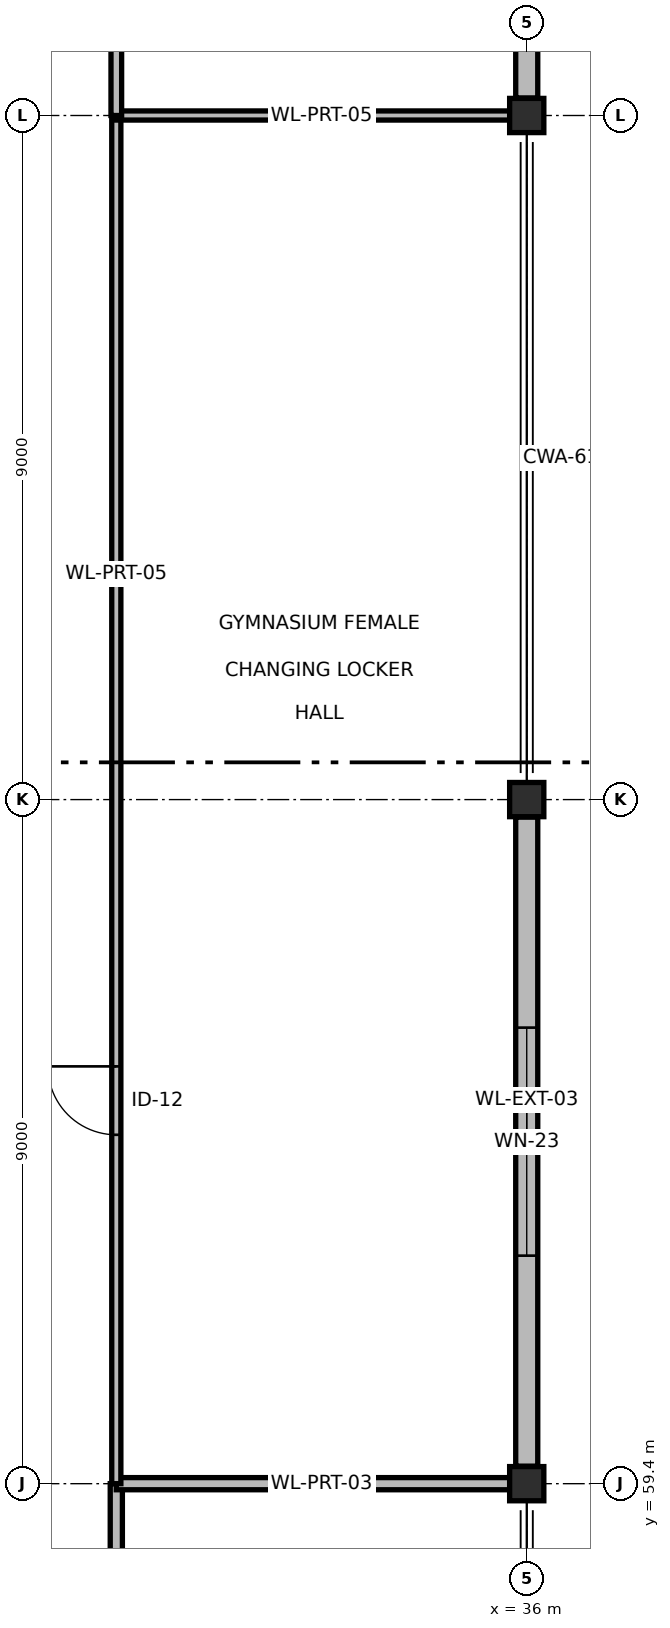
"""IFC4 building model, lengths in metres.
Left out: names, types, materials, properties, quantities, classifications, styles, units other than length and angle.
Written with IfcOpenShell. Run it as: python <this file> out.ifc"""

import sys

from ifc_helpers import new_model, si_unit, direction, frame, frame_2d, origin, origin_2d, place, context, subcontext, project, spatial, rectangle, extrude, element, fill, save


model = new_model("IFC4")
c1 = context("Model", 3, precision=1e-05, world=origin(), true_north=direction((0.0, 1.0)))
c2 = subcontext(c1, "Body", "Model", "MODEL_VIEW")
j1 = project(units=[si_unit("LENGTHUNIT", "METRE"), si_unit("PLANEANGLEUNIT", "RADIAN")], contexts=[c1])
p1 = place(None, origin())
s1 = spatial("IfcSite", under=j1, at=p1, CompositionType="ELEMENT")
p2 = place(p1, origin())
s2 = spatial("IfcBuilding", under=s1, at=p2, CompositionType="ELEMENT")
p3 = place(p2, frame((0.0, 0.0, 9.6)))
s3 = spatial("IfcBuildingStorey", under=s2, at=p3, CompositionType="ELEMENT", Elevation=9.6)
for number, where, z_axis, x_axis in (
    (1, (36.0, 59.4, 0.0), (0.0, 0.0, 1.0), (1.0, 0.0, 0.0)),
    (2, (36.0, 68.4, 0.0), (0.0, 0.0, 1.0), (1.0, 0.0, 0.0)),
    (3, (36.0, 77.4, 0.0), (0.0, 0.0, 1.0), (1.0, 0.0, 0.0)),
):
    element("IfcColumn", number, at=place(p3, frame(where, z_axis=z_axis, x_axis=x_axis)), inside=s3, PredefinedType="COLUMN", context=c2, shape_type="SweptSolid", body=[
        extrude(rectangle(XDim=0.45, YDim=0.45, at=origin_2d()), origin(), (0.0, 0.0, 1.0), 4.5),
    ])
p4 = place(p3, frame((36.0, 68.17, 0.0), z_axis=(0.0, 0.0, 1.0), x_axis=(0.0, -1.0, 0.0)))
e4 = element("IfcWall", 4, at=p4, inside=s3, PredefinedType="SOLIDWALL", context=c2, shape_type="SweptSolid", body=[
    extrude(rectangle(XDim=8.54, YDim=0.29, at=frame_2d((4.27, 0.0))), origin(), (0.0, 0.0, 1.0), 3.525),
])
p5 = place(p4, frame((2.77, 0.0, 0.85)))
e5 = element("IfcOpeningElement", 5, at=p5, cuts=e4, PredefinedType="OPENING", context=c2, shape_type="SweptSolid", body=[
    extrude(rectangle(XDim=3.0, YDim=2.0, at=frame_2d((1.5, 1.0))), frame((0.0, 0.155, 0.0), z_axis=(0.0, -1.0, 0.0), x_axis=(1.0, 0.0, 0.0)), (0.0, 0.0, 1.0), 0.31),
])
p6 = place(p3, frame((36.0, 86.17, 0.0), z_axis=(0.0, 0.0, 1.0), x_axis=(0.0, -1.0, 0.0)))
e6 = element("IfcWall", 6, at=p6, inside=s3, PredefinedType="SOLIDWALL", context=c2, shape_type="SweptSolid", body=[
    extrude(rectangle(XDim=8.54, YDim=0.29, at=frame_2d((4.27, 0.0))), origin(), (0.0, 0.0, 1.0), 3.525),
])
p7 = place(p3, frame((30.6, 39.6, 0.0), z_axis=(0.0, 0.0, 1.0), x_axis=(0.0, 1.0, 0.0)))
e7 = element("IfcWall", 7, at=p7, inside=s3, PredefinedType="PARTITIONING", context=c2, shape_type="SweptSolid", body=[
    extrude(rectangle(XDim=19.8, YDim=0.16, at=frame_2d((9.9, 0.0))), origin(), (0.0, 0.0, 1.0), 3.575),
])
p8 = place(p7, frame((13.706, 0.0, 0.0)))
e8 = element("IfcOpeningElement", 8, at=p8, cuts=e7, PredefinedType="OPENING", context=c2, shape_type="SweptSolid", body=[
    extrude(rectangle(XDim=1.1, YDim=2.15, at=frame_2d((0.55, 1.075))), frame((0.0, 0.09, 0.0), z_axis=(0.0, -1.0, 0.0), x_axis=(1.0, 0.0, 0.0)), (0.0, 0.0, 1.0), 0.18),
])
p9 = place(p3, frame((30.6, 59.4, 0.0), z_axis=(0.0, 0.0, 1.0), x_axis=(1.0, 0.0, 0.0)))
e9 = element("IfcWall", 9, at=p9, inside=s3, PredefinedType="PARTITIONING", context=c2, shape_type="SweptSolid", body=[
    extrude(rectangle(XDim=5.4, YDim=0.16, at=frame_2d((2.7, 0.0))), origin(), (0.0, 0.0, 1.0), 3.525),
])
p10 = place(p3, frame((30.6, 59.4, 0.0), z_axis=(0.0, 0.0, 1.0), x_axis=(0.0, 1.0, 0.0)))
e10 = element("IfcWall", 10, at=p10, inside=s3, PredefinedType="PARTITIONING", context=c2, shape_type="SweptSolid", body=[
    extrude(rectangle(XDim=18.0, YDim=0.12, at=frame_2d((9.0, 0.0))), origin(), (0.0, 0.0, 1.0), 3.575),
])
p11 = place(p10, frame((4.59, 0.0, 0.0)))
e11 = element("IfcOpeningElement", 11, at=p11, cuts=e10, PredefinedType="OPENING", context=c2, shape_type="SweptSolid", body=[
    extrude(rectangle(XDim=0.9, YDim=2.1, at=frame_2d((0.45, 1.05))), frame((0.0, 0.07, 0.0), z_axis=(0.0, -1.0, 0.0), x_axis=(1.0, 0.0, 0.0)), (0.0, 0.0, 1.0), 0.14),
])
p12 = place(p3, frame((30.6, 77.4, 0.0), z_axis=(0.0, 0.0, 1.0), x_axis=(1.0, 0.0, 0.0)))
e12 = element("IfcWall", 12, at=p12, inside=s3, PredefinedType="PARTITIONING", context=c2, shape_type="SweptSolid", body=[
    extrude(rectangle(XDim=5.4, YDim=0.12, at=frame_2d((2.7, 0.0))), origin(), (0.0, 0.0, 1.0), 3.525),
])
p13 = place(p3, frame((30.6, 77.4, 0.0), z_axis=(0.0, 0.0, 1.0), x_axis=(0.0, 1.0, 0.0)))
e13 = element("IfcWall", 13, at=p13, inside=s3, PredefinedType="PARTITIONING", context=c2, shape_type="SweptSolid", body=[
    extrude(rectangle(XDim=4.6, YDim=0.14, at=frame_2d((2.3, 0.0))), origin(), (0.0, 0.0, 1.0), 3.575),
])
p14 = place(p13, frame((3.063, 0.0, 0.0)))
e14 = element("IfcOpeningElement", 14, at=p14, cuts=e13, PredefinedType="OPENING", context=c2, shape_type="SweptSolid", body=[
    extrude(rectangle(XDim=1.05, YDim=2.2, at=frame_2d((0.525, 1.1))), frame((0.0, 0.08, 0.0), z_axis=(0.0, -1.0, 0.0), x_axis=(1.0, 0.0, 0.0)), (0.0, 0.0, 1.0), 0.16),
])
p15 = place(p5, origin())
e15 = element("IfcWindow", 15, at=p15, inside=s3, PartitioningType="SINGLE_PANEL", PredefinedType="WINDOW", context=c2, shape_type="SweptSolid", body=[
    extrude(rectangle(XDim=3.0, YDim=2.0, at=frame_2d((1.5, 1.0))), frame((0.0, 0.03, 0.0), z_axis=(0.0, -1.0, 0.0), x_axis=(1.0, 0.0, 0.0)), (0.0, 0.0, 1.0), 0.06),
])
fill(e5, e15)
p16 = place(p11, origin())
e16 = element("IfcDoor", 16, at=p16, inside=s3, OperationType="SINGLE_SWING_RIGHT", PredefinedType="DOOR", context=c2, shape_type="SweptSolid", body=[
    extrude(rectangle(XDim=0.9, YDim=2.1, at=frame_2d((0.45, 1.05))), frame((0.0, 0.025, 0.0), z_axis=(0.0, -1.0, 0.0), x_axis=(1.0, 0.0, 0.0)), (0.0, 0.0, 1.0), 0.05),
])
fill(e11, e16)
save(model, sys.argv[1])
